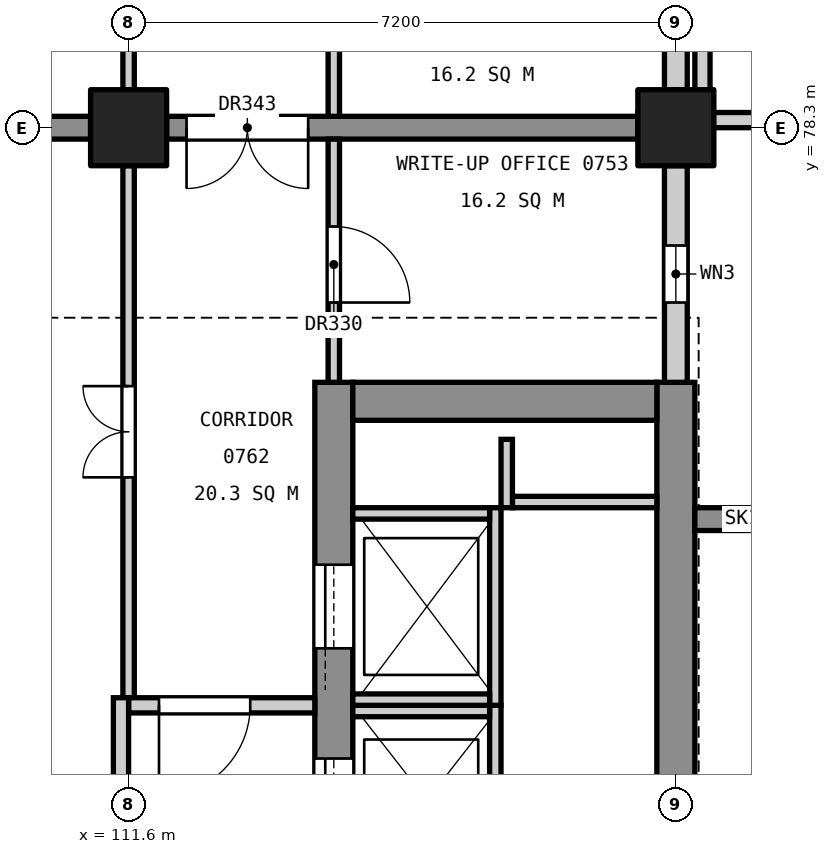
"""IFC4 building model, lengths in metres.
Left out: names, types, materials, properties, quantities, classifications, styles, units other than length and angle.
Written with IfcOpenShell. Run it as: python <this file> out.ifc"""

import sys

from ifc_helpers import new_model, si_unit, direction, frame, frame_2d, origin, origin_2d, place, context, subcontext, project, spatial, rectangle, extrude, element, fill, save


model = new_model("IFC4")
c1 = context("Model", 3, precision=1e-05, world=origin(), true_north=direction((0.0, 1.0)))
c2 = subcontext(c1, "Body", "Model", "MODEL_VIEW")
j1 = project(units=[si_unit("LENGTHUNIT", "METRE"), si_unit("PLANEANGLEUNIT", "RADIAN")], contexts=[c1])
p1 = place(None, origin())
s1 = spatial("IfcSite", under=j1, at=p1, CompositionType="ELEMENT")
p2 = place(p1, origin())
s2 = spatial("IfcBuilding", under=s1, at=p2, CompositionType="ELEMENT")
p3 = place(p2, frame((0.0, 0.0, 36.6)))
s3 = spatial("IfcBuildingStorey", under=s2, at=p3, CompositionType="ELEMENT", Elevation=36.6)
for number, where, z_axis, x_axis in (
    (1, (118.8, 78.3, 0.0), (0.0, 0.0, 1.0), (1.0, 0.0, 0.0)),
    (2, (111.6, 78.3, 0.0), (0.0, 0.0, 1.0), (1.0, 0.0, 0.0)),
):
    element("IfcColumn", number, at=place(p3, frame(where, z_axis=z_axis, x_axis=x_axis)), inside=s3, PredefinedType="COLUMN", context=c2, shape_type="SweptSolid", body=[
        extrude(rectangle(XDim=1.0, YDim=1.0, at=origin_2d()), origin(), (0.0, 0.0, 1.0), 4.8),
    ])
p4 = place(p3, frame((118.8, 60.05, 0.0), z_axis=(0.0, 0.0, 1.0), x_axis=(0.0, 1.0, 0.0)))
e3 = element("IfcWall", 3, at=p4, inside=s3, PredefinedType="SHEAR", context=c2, shape_type="SweptSolid", body=[
    extrude(rectangle(XDim=14.9, YDim=0.5, at=frame_2d((7.45, 0.0))), origin(), (0.0, 0.0, 1.0), 4.55),
])
p5 = place(p4, frame((6.16, 0.0, 3.4)))
e4 = element("IfcOpeningElement", 4, at=p5, cuts=e3, PredefinedType="OPENING", context=c2, shape_type="SweptSolid", body=[
    extrude(rectangle(XDim=1.2, YDim=0.9, at=frame_2d((0.6, 0.45))), frame((0.0, 0.26, 0.0), z_axis=(0.0, -1.0, 0.0), x_axis=(1.0, 0.0, 0.0)), (0.0, 0.0, 1.0), 0.52),
])
p6 = place(p3, frame((114.3, 60.05, 0.0), z_axis=(0.0, 0.0, 1.0), x_axis=(0.0, 1.0, 0.0)))
e5 = element("IfcWall", 5, at=p6, inside=s3, PredefinedType="SHEAR", context=c2, shape_type="SweptSolid", body=[
    extrude(rectangle(XDim=14.9, YDim=0.5, at=frame_2d((7.45, 0.0))), origin(), (0.0, 0.0, 1.0), 4.55),
])
p7 = place(p6, frame((0.55, 0.0, 0.0)))
e6 = element("IfcOpeningElement", 6, at=p7, cuts=e5, PredefinedType="OPENING", context=c2, shape_type="SweptSolid", body=[
    extrude(rectangle(XDim=1.4, YDim=2.1, at=frame_2d((0.7, 1.05))), frame((0.0, 0.26, 0.0), z_axis=(0.0, -1.0, 0.0), x_axis=(1.0, 0.0, 0.0)), (0.0, 0.0, 1.0), 0.52),
])
p8 = place(p6, frame((8.85, 0.0, 0.0)))
e7 = element("IfcOpeningElement", 7, at=p8, cuts=e5, PredefinedType="OPENING", context=c2, shape_type="SweptSolid", body=[
    extrude(rectangle(XDim=1.1, YDim=2.1, at=frame_2d((0.55, 1.05))), frame((0.0, 0.26, 0.0), z_axis=(0.0, -1.0, 0.0), x_axis=(1.0, 0.0, 0.0)), (0.0, 0.0, 1.0), 0.52),
])
p9 = place(p6, frame((11.4, 0.0, 0.0)))
e8 = element("IfcOpeningElement", 8, at=p9, cuts=e5, PredefinedType="OPENING", context=c2, shape_type="SweptSolid", body=[
    extrude(rectangle(XDim=1.1, YDim=2.1, at=frame_2d((0.55, 1.05))), frame((0.0, 0.26, 0.0), z_axis=(0.0, -1.0, 0.0), x_axis=(1.0, 0.0, 0.0)), (0.0, 0.0, 1.0), 0.52),
])
p10 = place(p3, frame((118.55, 74.7, 0.0), z_axis=(0.0, 0.0, 1.0), x_axis=(-1.0, 0.0, 0.0)))
e9 = element("IfcWall", 9, at=p10, inside=s3, PredefinedType="SHEAR", context=c2, shape_type="SweptSolid", body=[
    extrude(rectangle(XDim=4.0, YDim=0.5, at=frame_2d((2.0, 0.0))), origin(), (0.0, 0.0, 1.0), 4.55),
])
p11 = place(p3, frame((119.05, 73.15, 0.0), z_axis=(0.0, 0.0, 1.0), x_axis=(1.0, 0.0, 0.0)))
e10 = element("IfcWall", 10, at=p11, inside=s3, PredefinedType="SHEAR", context=c2, shape_type="SweptSolid", body=[
    extrude(rectangle(XDim=1.25, YDim=0.3, at=frame_2d((0.625, 0.0))), origin(), (0.0, 0.0, 1.0), 4.8),
])
p12 = place(p3, frame((118.3, 78.3, 0.0), z_axis=(0.0, 0.0, 1.0), x_axis=(-1.0, 0.0, 0.0)))
e11 = element("IfcWall", 11, at=p12, inside=s3, PredefinedType="SHEAR", context=c2, shape_type="SweptSolid", body=[
    extrude(rectangle(XDim=6.2, YDim=0.3, at=frame_2d((3.1, 0.0))), origin(), (0.0, 0.0, 1.0), 4.55),
])
p13 = place(p12, frame((4.337, 0.0, 0.0)))
e12 = element("IfcOpeningElement", 12, at=p13, cuts=e11, PredefinedType="OPENING", context=c2, shape_type="SweptSolid", body=[
    extrude(rectangle(XDim=1.6, YDim=2.1, at=frame_2d((0.8, 1.05))), frame((0.0, 0.16, 0.0), z_axis=(0.0, -1.0, 0.0), x_axis=(1.0, 0.0, 0.0)), (0.0, 0.0, 1.0), 0.32),
])
p14 = place(p3, frame((111.1, 78.3, 0.0), z_axis=(0.0, 0.0, 1.0), x_axis=(-1.0, 0.0, 0.0)))
e13 = element("IfcWall", 13, at=p14, inside=s3, PredefinedType="SHEAR", context=c2, shape_type="SweptSolid", body=[
    extrude(rectangle(XDim=9.8, YDim=0.3, at=frame_2d((4.9, 0.0))), origin(), (0.0, 0.0, 1.0), 4.55),
])
p15 = place(p3, frame((116.425, 68.2, 0.0), z_axis=(0.0, 0.0, 1.0), x_axis=(0.0, 1.0, 0.0)))
e14 = element("IfcWall", 14, at=p15, inside=s3, PredefinedType="SOLIDWALL", context=c2, shape_type="SweptSolid", body=[
    extrude(rectangle(XDim=2.5, YDim=0.15, at=frame_2d((1.25, 0.0))), origin(), (0.0, 0.0, 1.0), 4.8),
])
p16 = place(p3, frame((116.35, 70.625, 0.0), z_axis=(0.0, 0.0, 1.0), x_axis=(-1.0, 0.0, 0.0)))
e15 = element("IfcWall", 15, at=p16, inside=s3, PredefinedType="SOLIDWALL", context=c2, shape_type="SweptSolid", body=[
    extrude(rectangle(XDim=1.8, YDim=0.15, at=frame_2d((0.9, 0.0))), origin(), (0.0, 0.0, 1.0), 4.8),
])
p17 = place(p3, frame((116.425, 70.7, 0.0), z_axis=(0.0, 0.0, 1.0), x_axis=(0.0, 1.0, 0.0)))
e16 = element("IfcWall", 16, at=p17, inside=s3, PredefinedType="SOLIDWALL", context=c2, shape_type="SweptSolid", body=[
    extrude(rectangle(XDim=2.6, YDim=0.15, at=frame_2d((1.3, 0.0))), origin(), (0.0, 0.0, 1.0), 4.8),
])
for number, where, z_axis, x_axis in (
    (17, (116.35, 70.775, 0.0), (0.0, 0.0, 1.0), (-1.0, 0.0, 0.0)),
    (18, (116.35, 73.225, 0.0), (0.0, 0.0, 1.0), (-1.0, 0.0, 0.0)),
):
    element("IfcWall", number, at=place(p3, frame(where, z_axis=z_axis, x_axis=x_axis)), inside=s3, PredefinedType="SOLIDWALL", context=c2, shape_type="SweptSolid", body=[
        extrude(rectangle(XDim=1.8, YDim=0.15, at=frame_2d((0.9, 0.0))), origin(), (0.0, 0.0, 1.0), 4.8),
    ])
p18 = place(p3, frame((118.55, 73.375, 0.0), z_axis=(0.0, 0.0, 1.0), x_axis=(-1.0, 0.0, 0.0)))
e19 = element("IfcWall", 19, at=p18, inside=s3, PredefinedType="SOLIDWALL", context=c2, shape_type="SweptSolid", body=[
    extrude(rectangle(XDim=1.9, YDim=0.15, at=frame_2d((0.95, 0.0))), origin(), (0.0, 0.0, 1.0), 4.8),
])
p19 = place(p3, frame((116.575, 73.3, 0.0), z_axis=(0.0, 0.0, 1.0), x_axis=(0.0, 1.0, 0.0)))
e20 = element("IfcWall", 20, at=p19, inside=s3, PredefinedType="SOLIDWALL", context=c2, shape_type="SweptSolid", body=[
    extrude(rectangle(XDim=0.9, YDim=0.15, at=frame_2d((0.45, 0.0))), origin(), (0.0, 0.0, 1.0), 4.8),
])
p20 = place(p3, frame((123.6, 78.4, 0.0), z_axis=(0.0, 0.0, 1.0), x_axis=(-1.0, 0.0, 0.0)))
e21 = element("IfcWall", 21, at=p20, inside=s3, PredefinedType="PARAPET", context=c2, shape_type="SweptSolid", body=[
    extrude(rectangle(XDim=5.3, YDim=0.2, at=frame_2d((2.65, 0.0))), origin(), (0.0, 0.0, 1.0), 1.2),
])
p21 = place(p3, frame((119.15, 78.5, 0.0), z_axis=(0.0, 0.0, 1.0), x_axis=(0.0, 1.0, 0.0)))
e22 = element("IfcWall", 22, at=p21, inside=s3, PredefinedType="PARAPET", context=c2, shape_type="SweptSolid", body=[
    extrude(rectangle(XDim=6.8, YDim=0.2, at=frame_2d((3.4, 0.0))), origin(), (0.0, 0.0, 1.0), 1.2),
])
p22 = place(p3, frame((118.8, 74.95, 0.0), z_axis=(0.0, 0.0, 1.0), x_axis=(0.0, 1.0, 0.0)))
e23 = element("IfcWall", 23, at=p22, inside=s3, PredefinedType="STANDARD", context=c2, shape_type="SweptSolid", body=[
    extrude(rectangle(XDim=2.85, YDim=0.3, at=frame_2d((1.425, 0.0))), origin(), (0.0, 0.0, 1.0), 3.65),
])
p23 = place(p22, frame((1.05, 0.0, 0.8)))
e24 = element("IfcOpeningElement", 24, at=p23, cuts=e23, PredefinedType="OPENING", context=c2, shape_type="SweptSolid", body=[
    extrude(rectangle(XDim=0.75, YDim=1.2, at=frame_2d((0.375, 0.6))), frame((0.0, 0.16, 0.0), z_axis=(0.0, -1.0, 0.0), x_axis=(1.0, 0.0, 0.0)), (0.0, 0.0, 1.0), 0.32),
])
p24 = place(p3, frame((118.8, 78.8, 0.0), z_axis=(0.0, 0.0, 1.0), x_axis=(0.0, 1.0, 0.0)))
e25 = element("IfcWall", 25, at=p24, inside=s3, PredefinedType="STANDARD", context=c2, shape_type="SweptSolid", body=[
    extrude(rectangle(XDim=10.05, YDim=0.3, at=frame_2d((5.025, 0.0))), origin(), (0.0, 0.0, 1.0), 3.65),
])
p25 = place(p24, frame((0.65, 0.0, 0.9)))
e26 = element("IfcOpeningElement", 26, at=p25, cuts=e25, PredefinedType="OPENING", context=c2, shape_type="SweptSolid", body=[
    extrude(rectangle(XDim=1.8, YDim=2.4, at=frame_2d((0.9, 1.2))), frame((0.0, 0.16, 0.0), z_axis=(0.0, -1.0, 0.0), x_axis=(1.0, 0.0, 0.0)), (0.0, 0.0, 1.0), 0.32),
])
p26 = place(p24, frame((4.0, 0.0, 0.9)))
e27 = element("IfcOpeningElement", 27, at=p26, cuts=e25, PredefinedType="OPENING", context=c2, shape_type="SweptSolid", body=[
    extrude(rectangle(XDim=1.8, YDim=2.4, at=frame_2d((0.9, 1.2))), frame((0.0, 0.16, 0.0), z_axis=(0.0, -1.0, 0.0), x_axis=(1.0, 0.0, 0.0)), (0.0, 0.0, 1.0), 0.32),
])
p27 = place(p24, frame((8.0, 0.0, 0.8)))
e28 = element("IfcOpeningElement", 28, at=p27, cuts=e25, PredefinedType="OPENING", context=c2, shape_type="SweptSolid", body=[
    extrude(rectangle(XDim=0.75, YDim=1.2, at=frame_2d((0.375, 0.6))), frame((0.0, 0.16, 0.0), z_axis=(0.0, -1.0, 0.0), x_axis=(1.0, 0.0, 0.0)), (0.0, 0.0, 1.0), 0.32),
])
p28 = place(p3, frame((114.3, 74.95, 0.0), z_axis=(0.0, 0.0, 1.0), x_axis=(0.0, 1.0, 0.0)))
e29 = element("IfcWall", 29, at=p28, inside=s3, PredefinedType="PARTITIONING", context=c2, shape_type="SweptSolid", body=[
    extrude(rectangle(XDim=3.2, YDim=0.15, at=frame_2d((1.6, 0.0))), origin(), (0.0, 0.0, 1.0), 3.55),
])
p29 = place(p28, frame((1.05, 0.0, 0.0)))
e30 = element("IfcOpeningElement", 30, at=p29, cuts=e29, PredefinedType="OPENING", context=c2, shape_type="SweptSolid", body=[
    extrude(rectangle(XDim=1.0, YDim=2.1, at=frame_2d((0.5, 1.05))), frame((0.0, 0.085, 0.0), z_axis=(0.0, -1.0, 0.0), x_axis=(1.0, 0.0, 0.0)), (0.0, 0.0, 1.0), 0.17),
])
p30 = place(p3, frame((114.3, 78.45, 0.0), z_axis=(0.0, 0.0, 1.0), x_axis=(0.0, 1.0, 0.0)))
e31 = element("IfcWall", 31, at=p30, inside=s3, PredefinedType="PARTITIONING", context=c2, shape_type="SweptSolid", body=[
    extrude(rectangle(XDim=10.4, YDim=0.15, at=frame_2d((5.2, 0.0))), origin(), (0.0, 0.0, 1.0), 3.55),
])
p31 = place(p30, frame((8.35, 0.0, 0.0)))
e32 = element("IfcOpeningElement", 32, at=p31, cuts=e31, PredefinedType="OPENING", context=c2, shape_type="SweptSolid", body=[
    extrude(rectangle(XDim=1.0, YDim=2.1, at=frame_2d((0.5, 1.05))), frame((0.0, 0.085, 0.0), z_axis=(0.0, -1.0, 0.0), x_axis=(1.0, 0.0, 0.0)), (0.0, 0.0, 1.0), 0.17),
])
p32 = place(p30, frame((4.75, 0.0, 0.0)))
e33 = element("IfcOpeningElement", 33, at=p32, cuts=e31, PredefinedType="OPENING", context=c2, shape_type="SweptSolid", body=[
    extrude(rectangle(XDim=1.0, YDim=2.1, at=frame_2d((0.5, 1.05))), frame((0.0, 0.085, 0.0), z_axis=(0.0, -1.0, 0.0), x_axis=(1.0, 0.0, 0.0)), (0.0, 0.0, 1.0), 0.17),
])
p33 = place(p30, frame((1.15, 0.0, 0.0)))
e34 = element("IfcOpeningElement", 34, at=p33, cuts=e31, PredefinedType="OPENING", context=c2, shape_type="SweptSolid", body=[
    extrude(rectangle(XDim=1.0, YDim=2.1, at=frame_2d((0.5, 1.05))), frame((0.0, 0.085, 0.0), z_axis=(0.0, -1.0, 0.0), x_axis=(1.0, 0.0, 0.0)), (0.0, 0.0, 1.0), 0.17),
])
p34 = place(p3, frame((111.6, 70.8, 0.0), z_axis=(0.0, 0.0, 1.0), x_axis=(0.0, 1.0, 0.0)))
e35 = element("IfcWall", 35, at=p34, inside=s3, PredefinedType="PARTITIONING", context=c2, shape_type="SweptSolid", body=[
    extrude(rectangle(XDim=7.0, YDim=0.15, at=frame_2d((3.5, 0.0))), origin(), (0.0, 0.0, 1.0), 3.55),
])
p35 = place(p34, frame((2.9, 0.0, 0.0)))
e36 = element("IfcOpeningElement", 36, at=p35, cuts=e35, PredefinedType="OPENING", context=c2, shape_type="SweptSolid", body=[
    extrude(rectangle(XDim=1.2, YDim=2.1, at=frame_2d((0.6, 1.05))), frame((0.0, 0.085, 0.0), z_axis=(0.0, -1.0, 0.0), x_axis=(1.0, 0.0, 0.0)), (0.0, 0.0, 1.0), 0.17),
])
p36 = place(p3, frame((111.6, 78.8, 0.0), z_axis=(0.0, 0.0, 1.0), x_axis=(0.0, 1.0, 0.0)))
e37 = element("IfcWall", 37, at=p36, inside=s3, PredefinedType="PARTITIONING", context=c2, shape_type="SweptSolid", body=[
    extrude(rectangle(XDim=9.8, YDim=0.15, at=frame_2d((4.9, 0.0))), origin(), (0.0, 0.0, 1.0), 3.55),
])
p37 = place(p36, frame((4.3, 0.0, 0.0)))
e38 = element("IfcOpeningElement", 38, at=p37, cuts=e37, PredefinedType="OPENING", context=c2, shape_type="SweptSolid", body=[
    extrude(rectangle(XDim=1.2, YDim=2.1, at=frame_2d((0.6, 1.05))), frame((0.0, 0.085, 0.0), z_axis=(0.0, -1.0, 0.0), x_axis=(1.0, 0.0, 0.0)), (0.0, 0.0, 1.0), 0.17),
])
p38 = place(p3, frame((114.05, 70.7, 0.0), z_axis=(0.0, 0.0, 1.0), x_axis=(-1.0, 0.0, 0.0)))
e39 = element("IfcWall", 39, at=p38, inside=s3, PredefinedType="PARTITIONING", context=c2, shape_type="SweptSolid", body=[
    extrude(rectangle(XDim=2.45, YDim=0.2, at=frame_2d((1.225, 0.0))), origin(), (0.0, 0.0, 1.0), 3.55),
])
p39 = place(p38, frame((0.85, 0.0, 0.0)))
e40 = element("IfcOpeningElement", 40, at=p39, cuts=e39, PredefinedType="OPENING", context=c2, shape_type="SweptSolid", body=[
    extrude(rectangle(XDim=1.2, YDim=2.1, at=frame_2d((0.6, 1.05))), frame((0.0, 0.11, 0.0), z_axis=(0.0, -1.0, 0.0), x_axis=(1.0, 0.0, 0.0)), (0.0, 0.0, 1.0), 0.22),
])
p40 = place(p3, frame((111.5, 68.0, 0.0), z_axis=(0.0, 0.0, 1.0), x_axis=(0.0, 1.0, 0.0)))
e41 = element("IfcWall", 41, at=p40, inside=s3, PredefinedType="PARTITIONING", context=c2, shape_type="SweptSolid", body=[
    extrude(rectangle(XDim=2.8, YDim=0.2, at=frame_2d((1.4, 0.0))), origin(), (0.0, 0.0, 1.0), 3.55),
])
p41 = place(p8, origin())
e42 = element("IfcDoor", 42, at=p41, inside=s3, OperationType="SLIDING_TO_LEFT", PredefinedType="DOOR", context=c2, shape_type="SweptSolid", body=[
    extrude(rectangle(XDim=1.1, YDim=2.1, at=frame_2d((0.55, 1.05))), frame((0.0, 0.025, 0.0), z_axis=(0.0, -1.0, 0.0), x_axis=(1.0, 0.0, 0.0)), (0.0, 0.0, 1.0), 0.05),
])
fill(e7, e42)
p42 = place(p9, origin())
e43 = element("IfcDoor", 43, at=p42, inside=s3, OperationType="SLIDING_TO_LEFT", PredefinedType="DOOR", context=c2, shape_type="SweptSolid", body=[
    extrude(rectangle(XDim=1.1, YDim=2.1, at=frame_2d((0.55, 1.05))), frame((0.0, 0.025, 0.0), z_axis=(0.0, -1.0, 0.0), x_axis=(1.0, 0.0, 0.0)), (0.0, 0.0, 1.0), 0.05),
])
fill(e8, e43)
p43 = place(p23, origin())
e44 = element("IfcWindow", 44, at=p43, inside=s3, PartitioningType="SINGLE_PANEL", PredefinedType="WINDOW", context=c2, shape_type="SweptSolid", body=[
    extrude(rectangle(XDim=0.75, YDim=1.2, at=frame_2d((0.375, 0.6))), frame((0.0, 0.03, 0.0), z_axis=(0.0, -1.0, 0.0), x_axis=(1.0, 0.0, 0.0)), (0.0, 0.0, 1.0), 0.06),
])
fill(e24, e44)
p44 = place(p29, frame((1.0, 0.0, 0.0), z_axis=(0.0, 0.0, 1.0), x_axis=(-1.0, 0.0, 0.0)))
e45 = element("IfcDoor", 45, at=p44, inside=s3, OperationType="SINGLE_SWING_RIGHT", PredefinedType="DOOR", context=c2, shape_type="SweptSolid", body=[
    extrude(rectangle(XDim=1.0, YDim=2.1, at=frame_2d((0.5, 1.05))), frame((0.0, 0.025, 0.0), z_axis=(0.0, -1.0, 0.0), x_axis=(1.0, 0.0, 0.0)), (0.0, 0.0, 1.0), 0.05),
])
fill(e30, e45)
p45 = place(p35, origin())
e46 = element("IfcDoor", 46, at=p45, inside=s3, OperationType="DOUBLE_DOOR_SINGLE_SWING", PredefinedType="DOOR", context=c2, shape_type="SweptSolid", body=[
    extrude(rectangle(XDim=1.2, YDim=2.1, at=frame_2d((0.6, 1.05))), frame((0.0, 0.025, 0.0), z_axis=(0.0, -1.0, 0.0), x_axis=(1.0, 0.0, 0.0)), (0.0, 0.0, 1.0), 0.05),
])
fill(e36, e46)
p46 = place(p39, origin())
e47 = element("IfcDoor", 47, at=p46, inside=s3, OperationType="SINGLE_SWING_RIGHT", PredefinedType="DOOR", context=c2, shape_type="SweptSolid", body=[
    extrude(rectangle(XDim=1.2, YDim=2.1, at=frame_2d((0.6, 1.05))), frame((0.0, 0.025, 0.0), z_axis=(0.0, -1.0, 0.0), x_axis=(1.0, 0.0, 0.0)), (0.0, 0.0, 1.0), 0.05),
])
fill(e40, e47)
p47 = place(p13, origin())
e48 = element("IfcDoor", 48, at=p47, inside=s3, OperationType="DOUBLE_DOOR_SINGLE_SWING", PredefinedType="DOOR", context=c2, shape_type="SweptSolid", body=[
    extrude(rectangle(XDim=1.6, YDim=2.1, at=frame_2d((0.8, 1.05))), frame((0.0, 0.025, 0.0), z_axis=(0.0, -1.0, 0.0), x_axis=(1.0, 0.0, 0.0)), (0.0, 0.0, 1.0), 0.05),
])
fill(e12, e48)
save(model, sys.argv[1])
